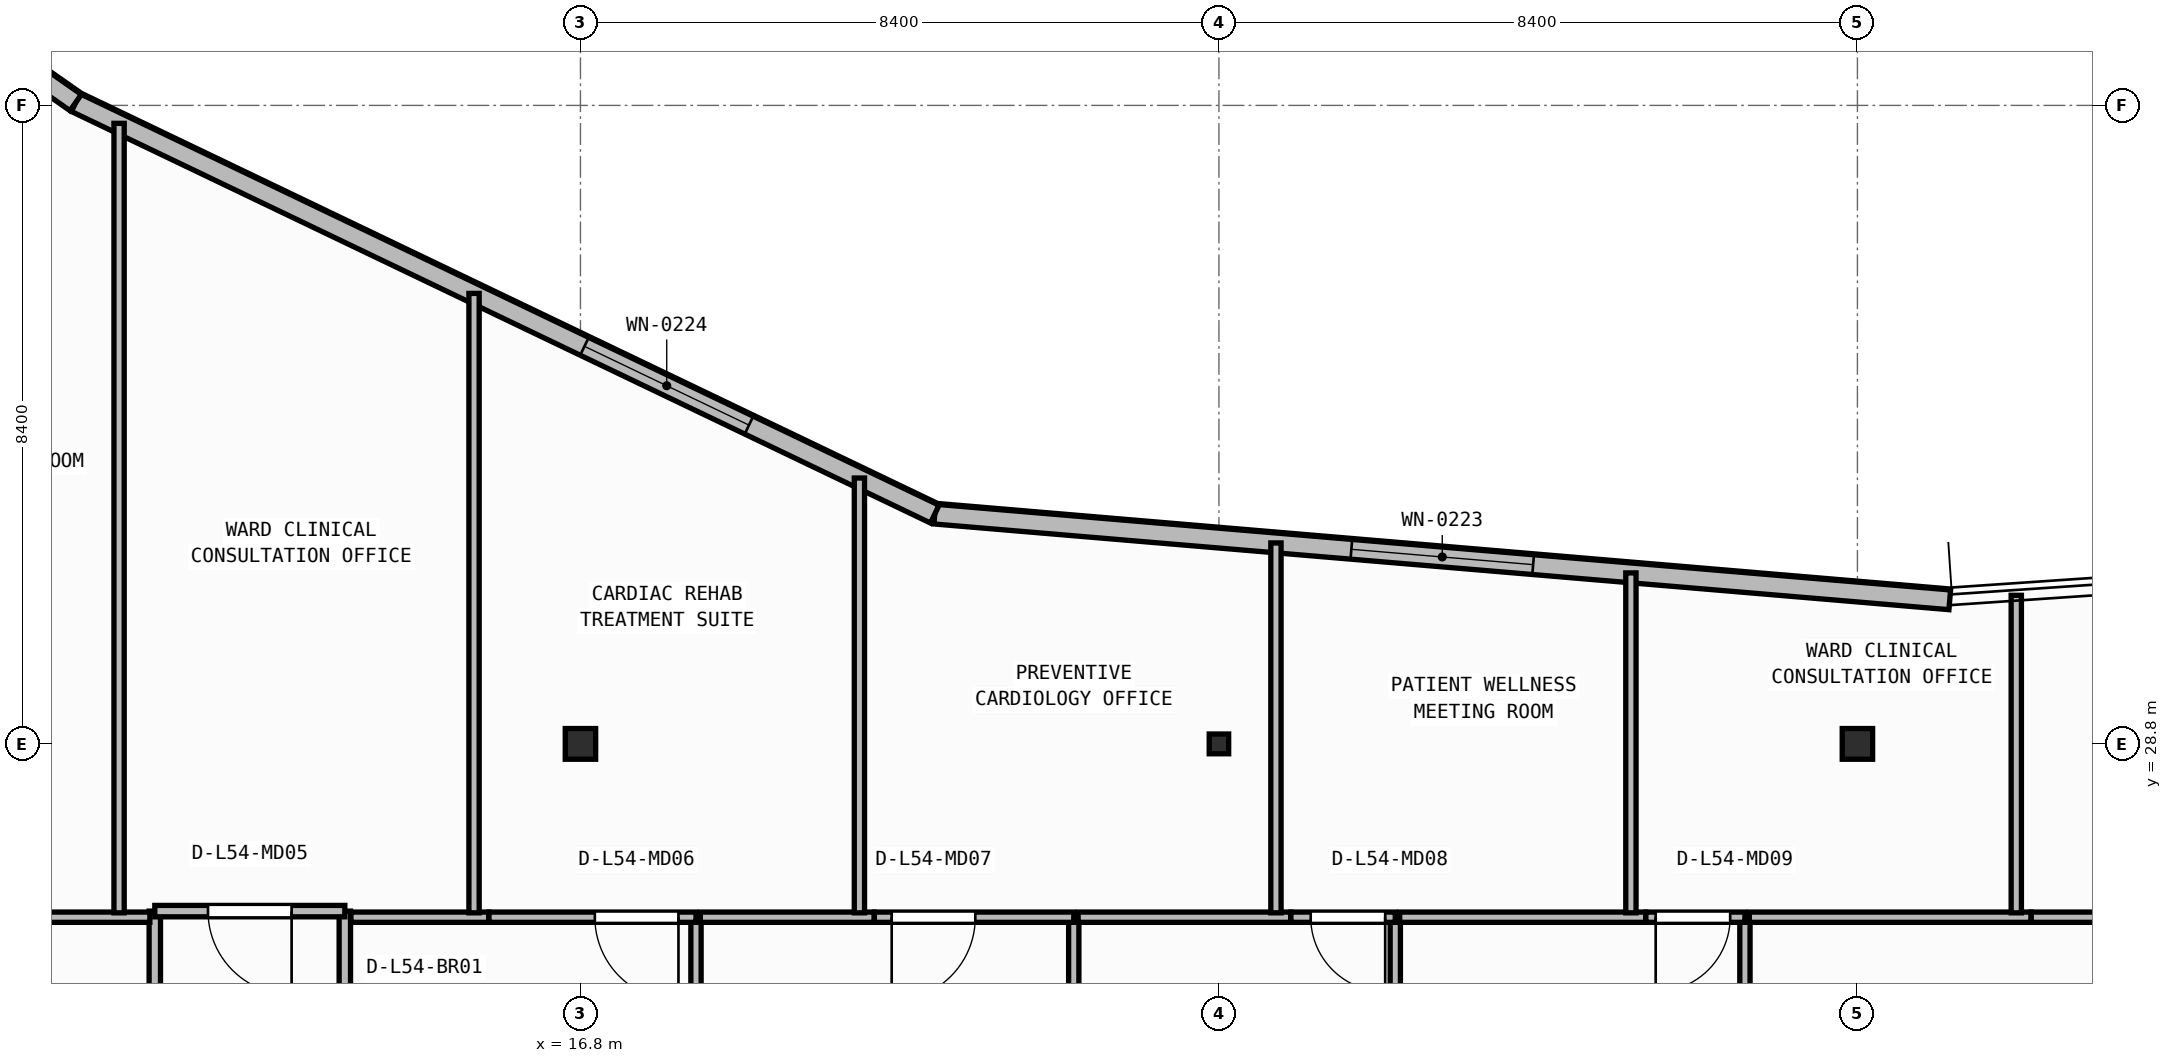
"""IFC4 building model, lengths in metres.
Left out: names, types, materials, properties, quantities, classifications, styles, units other than length and angle.
Written with IfcOpenShell. Run it as: python <this file> out.ifc"""

import sys

from ifc_helpers import new_model, si_unit, direction, frame, frame_2d, origin, origin_2d, place, context, subcontext, project, spatial, rectangle, i_section, extrude, element, fill, save


model = new_model("IFC4")
c1 = context("Model", 3, precision=1e-05, world=origin(), true_north=direction((0.0, 1.0)))
c2 = subcontext(c1, "Body", "Model", "MODEL_VIEW")
j1 = project(units=[si_unit("LENGTHUNIT", "METRE"), si_unit("PLANEANGLEUNIT", "RADIAN")], contexts=[c1])
p1 = place(None, origin())
s1 = spatial("IfcSite", under=j1, at=p1, CompositionType="ELEMENT")
p2 = place(p1, origin())
s2 = spatial("IfcBuilding", under=s1, at=p2, CompositionType="ELEMENT")
p3 = place(p2, frame((0.0, 0.0, 219.75)))
s3 = spatial("IfcBuildingStorey", under=s2, at=p3, CompositionType="ELEMENT", Elevation=219.75)
p4 = place(p3, frame((16.8, 28.8, 0.0), z_axis=(0.0, 0.0, 1.0), x_axis=(1.0, 0.0, 0.0)))
e1 = element("IfcColumn", 1, at=p4, inside=s3, PredefinedType="COLUMN", context=c2, shape_type="SweptSolid", body=[
    extrude(i_section(OverallWidth=0.4, OverallDepth=0.404, WebThickness=0.02, FlangeThickness=0.032, at=origin_2d()), origin(), (0.0, 0.0, 1.0), 3.95),
])
p5 = place(p3, frame((25.2, 28.8, 0.0), z_axis=(0.0, 0.0, 1.0), x_axis=(1.0, 0.0, 0.0)))
e2 = element("IfcColumn", 2, at=p5, inside=s3, PredefinedType="COLUMN", context=c2, shape_type="SweptSolid", body=[
    extrude(i_section(OverallWidth=0.256, OverallDepth=0.26, WebThickness=0.01, FlangeThickness=0.017, FilletRadius=0.013, at=origin_2d()), origin(), (0.0, 0.0, 1.0), 3.95),
])
p6 = place(p3, frame((33.6, 28.8, 0.0), z_axis=(0.0, 0.0, 1.0), x_axis=(1.0, 0.0, 0.0)))
e3 = element("IfcColumn", 3, at=p6, inside=s3, PredefinedType="COLUMN", context=c2, shape_type="SweptSolid", body=[
    extrude(i_section(OverallWidth=0.4, OverallDepth=0.404, WebThickness=0.02, FlangeThickness=0.032, at=origin_2d()), origin(), (0.0, 0.0, 1.0), 3.95),
])
p7 = place(p3, frame((34.815, 30.696, 0.0), z_axis=(0.0, 0.0, 1.0), x_axis=(-0.996454704935, 0.084130975344, 0.0)))
e4 = element("IfcWall", 4, at=p7, inside=s3, PredefinedType="STANDARD", context=c2, shape_type="SweptSolid", body=[
    extrude(rectangle(XDim=13.401, YDim=0.26, at=frame_2d((6.701, 0.0))), origin(), (0.0, 0.0, 1.0), 3.71),
])
p8 = place(p7, frame((5.5, 0.0, 0.9)))
e5 = element("IfcOpeningElement", 5, at=p8, cuts=e4, PredefinedType="OPENING", context=c2, shape_type="SweptSolid", body=[
    extrude(rectangle(XDim=2.4, YDim=1.65, at=frame_2d((1.2, 0.825))), frame((0.0, 0.14, 0.0), z_axis=(0.0, -1.0, 0.0), x_axis=(1.0, 0.0, 0.0)), (0.0, 0.0, 1.0), 0.28),
])
p9 = place(p3, frame((21.461, 31.823, 0.0), z_axis=(0.0, 0.0, 1.0), x_axis=(-0.901858094827, 0.432032379336, 0.0)))
e6 = element("IfcWall", 6, at=p9, inside=s3, PredefinedType="STANDARD", context=c2, shape_type="SweptSolid", body=[
    extrude(rectangle(XDim=12.532, YDim=0.26, at=frame_2d((6.266, 0.0))), origin(), (0.0, 0.0, 1.0), 3.71),
])
p10 = place(p9, frame((2.71, 0.0, 0.9)))
e7 = element("IfcOpeningElement", 7, at=p10, cuts=e6, PredefinedType="OPENING", context=c2, shape_type="SweptSolid", body=[
    extrude(rectangle(XDim=2.4, YDim=1.65, at=frame_2d((1.2, 0.825))), frame((0.0, 0.14, 0.0), z_axis=(0.0, -1.0, 0.0), x_axis=(1.0, 0.0, 0.0)), (0.0, 0.0, 1.0), 0.28),
])
p11 = place(p3, frame((10.159, 37.237, 0.0), z_axis=(0.0, 0.0, 1.0), x_axis=(-0.818933702389, 0.57388813465, 0.0)))
e8 = element("IfcWall", 8, at=p11, inside=s3, PredefinedType="STANDARD", context=c2, shape_type="SweptSolid", body=[
    extrude(rectangle(XDim=9.157, YDim=0.26, at=frame_2d((4.579, 0.0))), origin(), (0.0, 0.0, 1.0), 3.71),
])
p12 = place(p11, frame((1.787, 0.0, 0.9)))
e9 = element("IfcOpeningElement", 9, at=p12, cuts=e8, PredefinedType="OPENING", context=c2, shape_type="SweptSolid", body=[
    extrude(rectangle(XDim=2.4, YDim=1.65, at=frame_2d((1.2, 0.825))), frame((0.0, 0.14, 0.0), z_axis=(0.0, -1.0, 0.0), x_axis=(1.0, 0.0, 0.0)), (0.0, 0.0, 1.0), 0.28),
])
p13 = place(p3, frame((11.2, 26.6, 0.0), z_axis=(0.0, 0.0, 1.0), x_axis=(0.0, -1.0, 0.0)))
e10 = element("IfcWall", 10, at=p13, inside=s3, PredefinedType="PARTITIONING", context=c2, shape_type="SweptSolid", body=[
    extrude(rectangle(XDim=11.9, YDim=0.15, at=frame_2d((5.95, 0.0))), origin(), (0.0, 0.0, 1.0), 3.71),
])
p14 = place(p3, frame((13.7, 22.994, 0.0), z_axis=(0.0, 0.0, 1.0), x_axis=(0.0, 1.0, 0.0)))
e11 = element("IfcWall", 11, at=p14, inside=s3, PredefinedType="PARTITIONING", context=c2, shape_type="SweptSolid", body=[
    extrude(rectangle(XDim=3.606, YDim=0.15, at=frame_2d((1.803, 0.0))), origin(), (0.0, 0.0, 1.0), 3.71),
])
p15 = place(p14, frame((1.253, 0.0, 0.0)))
e12 = element("IfcOpeningElement", 12, at=p15, cuts=e11, PredefinedType="OPENING", context=c2, shape_type="SweptSolid", body=[
    extrude(rectangle(XDim=1.1, YDim=2.1, at=frame_2d((0.55, 1.05))), frame((0.0, 0.085, 0.0), z_axis=(0.0, -1.0, 0.0), x_axis=(1.0, 0.0, 0.0)), (0.0, 0.0, 1.0), 0.17),
])
p16 = place(p3, frame((13.7, 26.6, 0.0), z_axis=(0.0, 0.0, 1.0), x_axis=(-1.0, 0.0, 0.0)))
e13 = element("IfcWall", 13, at=p16, inside=s3, PredefinedType="PARTITIONING", context=c2, shape_type="SweptSolid", body=[
    extrude(rectangle(XDim=2.5, YDim=0.15, at=frame_2d((1.25, 0.0))), origin(), (0.0, 0.0, 1.0), 3.71),
])
p17 = place(p16, frame((0.7, 0.0, 0.0)))
e14 = element("IfcOpeningElement", 14, at=p17, cuts=e13, PredefinedType="OPENING", context=c2, shape_type="SweptSolid", body=[
    extrude(rectangle(XDim=1.1, YDim=2.1, at=frame_2d((0.55, 1.05))), frame((0.0, 0.085, 0.0), z_axis=(0.0, -1.0, 0.0), x_axis=(1.0, 0.0, 0.0)), (0.0, 0.0, 1.0), 0.17),
])
p18 = place(p3, frame((11.135, 26.52, 0.0), z_axis=(0.0, 0.0, 1.0), x_axis=(-1.0, 0.0, 0.0)))
e15 = element("IfcWall", 15, at=p18, inside=s3, PredefinedType="PARTITIONING", context=c2, shape_type="SweptSolid", body=[
    extrude(rectangle(XDim=3.498, YDim=0.135, at=frame_2d((1.749, 0.0))), origin(), (0.0, 0.0, 1.0), 3.71),
])
p19 = place(p3, frame((18.32, 23.012, 0.0), z_axis=(0.0, 0.0, 1.0), x_axis=(0.0, 1.0, 0.0)))
e16 = element("IfcWall", 16, at=p19, inside=s3, PredefinedType="PARTITIONING", context=c2, shape_type="SweptSolid", body=[
    extrude(rectangle(XDim=3.508, YDim=0.135, at=frame_2d((1.754, 0.0))), origin(), (0.0, 0.0, 1.0), 3.71),
])
p20 = place(p3, frame((15.594, 26.52, 0.0), z_axis=(0.0, 0.0, 1.0), x_axis=(-1.0, 0.0, 0.0)))
e17 = element("IfcWall", 17, at=p20, inside=s3, PredefinedType="PARTITIONING", context=c2, shape_type="SweptSolid", body=[
    extrude(rectangle(XDim=1.814, YDim=0.135, at=frame_2d((0.907, 0.0))), origin(), (0.0, 0.0, 1.0), 3.71),
])
p21 = place(p3, frame((18.32, 26.52, 0.0), z_axis=(0.0, 0.0, 1.0), x_axis=(-1.0, 0.0, 0.0)))
e18 = element("IfcWall", 18, at=p21, inside=s3, PredefinedType="PARTITIONING", context=c2, shape_type="SweptSolid", body=[
    extrude(rectangle(XDim=2.723, YDim=0.135, at=frame_2d((1.362, 0.0))), origin(), (0.0, 0.0, 1.0), 3.71),
])
p22 = place(p21, frame((0.231, 0.0, 0.0)))
e19 = element("IfcOpeningElement", 19, at=p22, cuts=e18, PredefinedType="OPENING", context=c2, shape_type="SweptSolid", body=[
    extrude(rectangle(XDim=1.1, YDim=2.1, at=frame_2d((0.55, 1.05))), frame((0.0, 0.077, 0.0), z_axis=(0.0, -1.0, 0.0), x_axis=(1.0, 0.0, 0.0)), (0.0, 0.0, 1.0), 0.155),
])
p23 = place(p3, frame((23.29, 23.012, 0.0), z_axis=(0.0, 0.0, 1.0), x_axis=(0.0, 1.0, 0.0)))
e20 = element("IfcWall", 20, at=p23, inside=s3, PredefinedType="PARTITIONING", context=c2, shape_type="SweptSolid", body=[
    extrude(rectangle(XDim=3.508, YDim=0.135, at=frame_2d((1.754, 0.0))), origin(), (0.0, 0.0, 1.0), 3.71),
])
p24 = place(p3, frame((20.665, 26.52, 0.0), z_axis=(0.0, 0.0, 1.0), x_axis=(-1.0, 0.0, 0.0)))
e21 = element("IfcWall", 21, at=p24, inside=s3, PredefinedType="PARTITIONING", context=c2, shape_type="SweptSolid", body=[
    extrude(rectangle(XDim=2.287, YDim=0.135, at=frame_2d((1.144, 0.0))), origin(), (0.0, 0.0, 1.0), 3.71),
])
p25 = place(p3, frame((23.29, 26.52, 0.0), z_axis=(0.0, 0.0, 1.0), x_axis=(-1.0, 0.0, 0.0)))
e22 = element("IfcWall", 22, at=p25, inside=s3, PredefinedType="PARTITIONING", context=c2, shape_type="SweptSolid", body=[
    extrude(rectangle(XDim=2.624, YDim=0.135, at=frame_2d((1.312, 0.0))), origin(), (0.0, 0.0, 1.0), 3.71),
])
p26 = place(p25, frame((1.295, 0.0, 0.0)))
e23 = element("IfcOpeningElement", 23, at=p26, cuts=e22, PredefinedType="OPENING", context=c2, shape_type="SweptSolid", body=[
    extrude(rectangle(XDim=1.1, YDim=2.1, at=frame_2d((0.55, 1.05))), frame((0.0, 0.077, 0.0), z_axis=(0.0, -1.0, 0.0), x_axis=(1.0, 0.0, 0.0)), (0.0, 0.0, 1.0), 0.155),
])
p27 = place(p3, frame((27.52, 23.012, 0.0), z_axis=(0.0, 0.0, 1.0), x_axis=(0.0, 1.0, 0.0)))
e24 = element("IfcWall", 24, at=p27, inside=s3, PredefinedType="PARTITIONING", context=c2, shape_type="SweptSolid", body=[
    extrude(rectangle(XDim=3.508, YDim=0.135, at=frame_2d((1.754, 0.0))), origin(), (0.0, 0.0, 1.0), 3.71),
])
p28 = place(p3, frame((26.145, 26.52, 0.0), z_axis=(0.0, 0.0, 1.0), x_axis=(-1.0, 0.0, 0.0)))
e25 = element("IfcWall", 25, at=p28, inside=s3, PredefinedType="PARTITIONING", context=c2, shape_type="SweptSolid", body=[
    extrude(rectangle(XDim=2.797, YDim=0.135, at=frame_2d((1.398, 0.0))), origin(), (0.0, 0.0, 1.0), 3.71),
])
p29 = place(p3, frame((27.52, 26.52, 0.0), z_axis=(0.0, 0.0, 1.0), x_axis=(-1.0, 0.0, 0.0)))
e26 = element("IfcWall", 26, at=p29, inside=s3, PredefinedType="PARTITIONING", context=c2, shape_type="SweptSolid", body=[
    extrude(rectangle(XDim=1.374, YDim=0.135, at=frame_2d((0.687, 0.0))), origin(), (0.0, 0.0, 1.0), 3.71),
])
p30 = place(p29, frame((0.133, 0.0, 0.0)))
e27 = element("IfcOpeningElement", 27, at=p30, cuts=e26, PredefinedType="OPENING", context=c2, shape_type="SweptSolid", body=[
    extrude(rectangle(XDim=0.98, YDim=2.1, at=frame_2d((0.49, 1.05))), frame((0.0, 0.077, 0.0), z_axis=(0.0, -1.0, 0.0), x_axis=(1.0, 0.0, 0.0)), (0.0, 0.0, 1.0), 0.155),
])
p31 = place(p3, frame((32.12, 23.012, 0.0), z_axis=(0.0, 0.0, 1.0), x_axis=(0.0, 1.0, 0.0)))
e28 = element("IfcWall", 28, at=p31, inside=s3, PredefinedType="PARTITIONING", context=c2, shape_type="SweptSolid", body=[
    extrude(rectangle(XDim=3.508, YDim=0.135, at=frame_2d((1.754, 0.0))), origin(), (0.0, 0.0, 1.0), 3.71),
])
p32 = place(p3, frame((30.815, 26.52, 0.0), z_axis=(0.0, 0.0, 1.0), x_axis=(-1.0, 0.0, 0.0)))
e29 = element("IfcWall", 29, at=p32, inside=s3, PredefinedType="PARTITIONING", context=c2, shape_type="SweptSolid", body=[
    extrude(rectangle(XDim=3.237, YDim=0.135, at=frame_2d((1.619, 0.0))), origin(), (0.0, 0.0, 1.0), 3.71),
])
p33 = place(p3, frame((32.12, 26.52, 0.0), z_axis=(0.0, 0.0, 1.0), x_axis=(-1.0, 0.0, 0.0)))
e30 = element("IfcWall", 30, at=p33, inside=s3, PredefinedType="PARTITIONING", context=c2, shape_type="SweptSolid", body=[
    extrude(rectangle(XDim=1.303, YDim=0.135, at=frame_2d((0.652, 0.0))), origin(), (0.0, 0.0, 1.0), 3.71),
])
p34 = place(p33, frame((0.194, 0.0, 0.0)))
e31 = element("IfcOpeningElement", 31, at=p34, cuts=e30, PredefinedType="OPENING", context=c2, shape_type="SweptSolid", body=[
    extrude(rectangle(XDim=0.98, YDim=2.1, at=frame_2d((0.49, 1.05))), frame((0.0, 0.077, 0.0), z_axis=(0.0, -1.0, 0.0), x_axis=(1.0, 0.0, 0.0)), (0.0, 0.0, 1.0), 0.155),
])
p35 = place(p3, frame((35.885, 26.52, 0.0), z_axis=(0.0, 0.0, 1.0), x_axis=(-1.0, 0.0, 0.0)))
e32 = element("IfcWall", 32, at=p35, inside=s3, PredefinedType="PARTITIONING", context=c2, shape_type="SweptSolid", body=[
    extrude(rectangle(XDim=3.707, YDim=0.135, at=frame_2d((1.854, 0.0))), origin(), (0.0, 0.0, 1.0), 3.71),
])
p36 = place(p3, frame((37.09, 26.52, 0.0), z_axis=(0.0, 0.0, 1.0), x_axis=(-1.0, 0.0, 0.0)))
e33 = element("IfcWall", 33, at=p36, inside=s3, PredefinedType="PARTITIONING", context=c2, shape_type="SweptSolid", body=[
    extrude(rectangle(XDim=1.203, YDim=0.135, at=frame_2d((0.602, 0.0))), origin(), (0.0, 0.0, 1.0), 3.71),
])
p37 = place(p3, frame((10.73, 26.577, 0.0), z_axis=(0.0, 0.0, 1.0), x_axis=(0.0, 1.0, 0.0)))
e34 = element("IfcWall", 34, at=p37, inside=s3, PredefinedType="PARTITIONING", context=c2, shape_type="SweptSolid", body=[
    extrude(rectangle(XDim=10.386, YDim=0.135, at=frame_2d((5.193, 0.0))), origin(), (0.0, 0.0, 1.0), 3.71),
])
p38 = place(p3, frame((15.4, 26.577, 0.0), z_axis=(0.0, 0.0, 1.0), x_axis=(0.0, 1.0, 0.0)))
e35 = element("IfcWall", 35, at=p38, inside=s3, PredefinedType="PARTITIONING", context=c2, shape_type="SweptSolid", body=[
    extrude(rectangle(XDim=8.149, YDim=0.135, at=frame_2d((4.075, 0.0))), origin(), (0.0, 0.0, 1.0), 3.71),
])
p39 = place(p3, frame((20.47, 26.577, 0.0), z_axis=(0.0, 0.0, 1.0), x_axis=(0.0, 1.0, 0.0)))
e36 = element("IfcWall", 36, at=p39, inside=s3, PredefinedType="PARTITIONING", context=c2, shape_type="SweptSolid", body=[
    extrude(rectangle(XDim=5.72, YDim=0.135, at=frame_2d((2.86, 0.0))), origin(), (0.0, 0.0, 1.0), 3.71),
])
p40 = place(p3, frame((25.95, 26.577, 0.0), z_axis=(0.0, 0.0, 1.0), x_axis=(0.0, 1.0, 0.0)))
e37 = element("IfcWall", 37, at=p40, inside=s3, PredefinedType="PARTITIONING", context=c2, shape_type="SweptSolid", body=[
    extrude(rectangle(XDim=4.867, YDim=0.135, at=frame_2d((2.433, 0.0))), origin(), (0.0, 0.0, 1.0), 3.71),
])
p41 = place(p3, frame((30.62, 26.577, 0.0), z_axis=(0.0, 0.0, 1.0), x_axis=(0.0, 1.0, 0.0)))
e38 = element("IfcWall", 38, at=p41, inside=s3, PredefinedType="PARTITIONING", context=c2, shape_type="SweptSolid", body=[
    extrude(rectangle(XDim=4.472, YDim=0.135, at=frame_2d((2.236, 0.0))), origin(), (0.0, 0.0, 1.0), 3.71),
])
p42 = place(p3, frame((35.69, 26.577, 0.0), z_axis=(0.0, 0.0, 1.0), x_axis=(0.0, 1.0, 0.0)))
e39 = element("IfcWall", 39, at=p42, inside=s3, PredefinedType="PARTITIONING", context=c2, shape_type="SweptSolid", body=[
    extrude(rectangle(XDim=4.178, YDim=0.135, at=frame_2d((2.089, 0.0))), origin(), (0.0, 0.0, 1.0), 3.71),
])
p43 = place(p8, origin())
e40 = element("IfcWindow", 40, at=p43, inside=s3, PartitioningType="SINGLE_PANEL", PredefinedType="WINDOW", context=c2, shape_type="SweptSolid", body=[
    extrude(rectangle(XDim=2.4, YDim=1.65, at=frame_2d((1.2, 0.825))), frame((0.0, 0.03, 0.0), z_axis=(0.0, -1.0, 0.0), x_axis=(1.0, 0.0, 0.0)), (0.0, 0.0, 1.0), 0.06),
])
fill(e5, e40)
p44 = place(p10, origin())
e41 = element("IfcWindow", 41, at=p44, inside=s3, PartitioningType="SINGLE_PANEL", PredefinedType="WINDOW", context=c2, shape_type="SweptSolid", body=[
    extrude(rectangle(XDim=2.4, YDim=1.65, at=frame_2d((1.2, 0.825))), frame((0.0, 0.03, 0.0), z_axis=(0.0, -1.0, 0.0), x_axis=(1.0, 0.0, 0.0)), (0.0, 0.0, 1.0), 0.06),
])
fill(e7, e41)
p45 = place(p17, origin())
e42 = element("IfcDoor", 42, at=p45, inside=s3, OperationType="SINGLE_SWING_LEFT", PredefinedType="DOOR", context=c2, shape_type="SweptSolid", body=[
    extrude(rectangle(XDim=1.1, YDim=2.1, at=frame_2d((0.55, 1.05))), frame((0.0, 0.025, 0.0), z_axis=(0.0, -1.0, 0.0), x_axis=(1.0, 0.0, 0.0)), (0.0, 0.0, 1.0), 0.05),
])
fill(e14, e42)
p46 = place(p22, origin())
e43 = element("IfcDoor", 43, at=p46, inside=s3, OperationType="SINGLE_SWING_LEFT", PredefinedType="DOOR", context=c2, shape_type="SweptSolid", body=[
    extrude(rectangle(XDim=1.1, YDim=2.1, at=frame_2d((0.55, 1.05))), frame((0.0, 0.025, 0.0), z_axis=(0.0, -1.0, 0.0), x_axis=(1.0, 0.0, 0.0)), (0.0, 0.0, 1.0), 0.05),
])
fill(e19, e43)
p47 = place(p26, origin())
e44 = element("IfcDoor", 44, at=p47, inside=s3, OperationType="SINGLE_SWING_RIGHT", PredefinedType="DOOR", context=c2, shape_type="SweptSolid", body=[
    extrude(rectangle(XDim=1.1, YDim=2.1, at=frame_2d((0.55, 1.05))), frame((0.0, 0.025, 0.0), z_axis=(0.0, -1.0, 0.0), x_axis=(1.0, 0.0, 0.0)), (0.0, 0.0, 1.0), 0.05),
])
fill(e23, e44)
p48 = place(p30, origin())
e45 = element("IfcDoor", 45, at=p48, inside=s3, OperationType="SINGLE_SWING_LEFT", PredefinedType="DOOR", context=c2, shape_type="SweptSolid", body=[
    extrude(rectangle(XDim=0.98, YDim=2.1, at=frame_2d((0.49, 1.05))), frame((0.0, 0.025, 0.0), z_axis=(0.0, -1.0, 0.0), x_axis=(1.0, 0.0, 0.0)), (0.0, 0.0, 1.0), 0.05),
])
fill(e27, e45)
p49 = place(p34, origin())
e46 = element("IfcDoor", 46, at=p49, inside=s3, OperationType="SINGLE_SWING_RIGHT", PredefinedType="DOOR", context=c2, shape_type="SweptSolid", body=[
    extrude(rectangle(XDim=0.98, YDim=2.1, at=frame_2d((0.49, 1.05))), frame((0.0, 0.025, 0.0), z_axis=(0.0, -1.0, 0.0), x_axis=(1.0, 0.0, 0.0)), (0.0, 0.0, 1.0), 0.05),
])
fill(e31, e46)
save(model, sys.argv[1])
